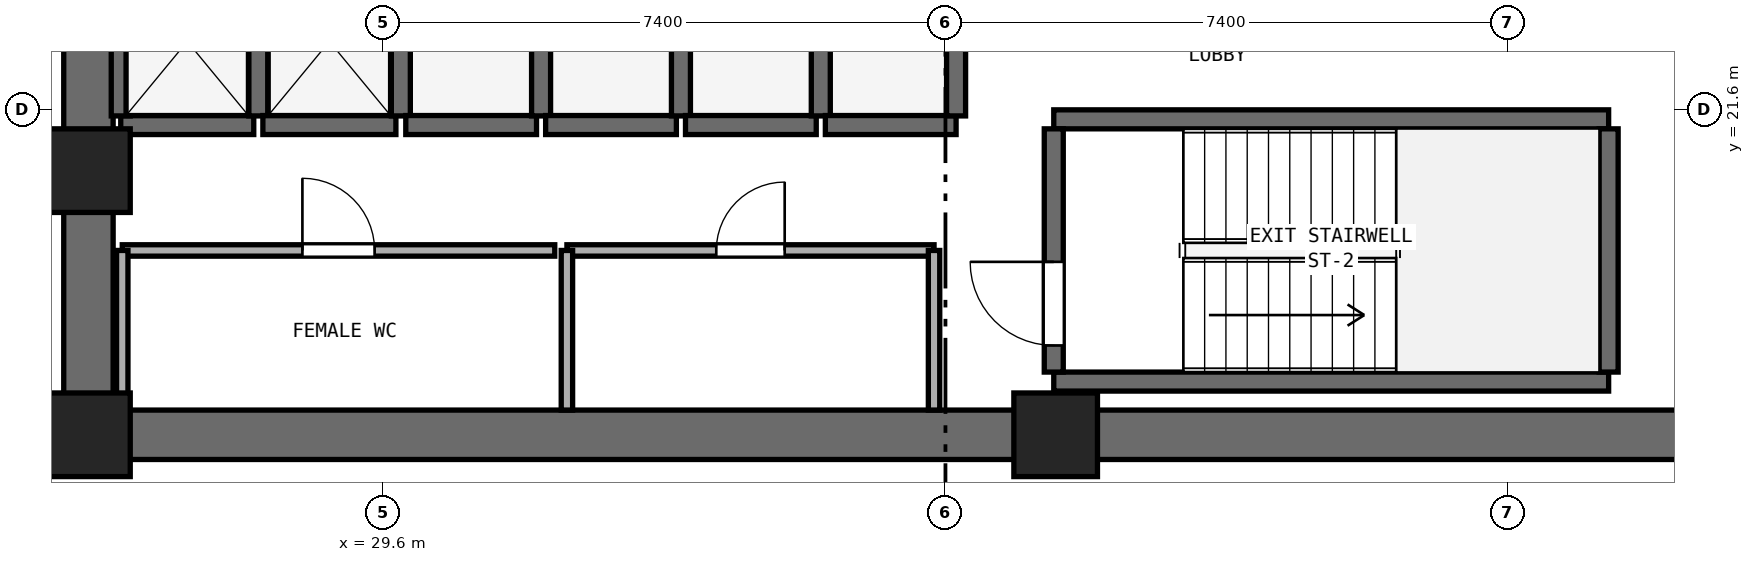
"""IFC4 building model, lengths in metres.
Left out: names, types, materials, properties, quantities, classifications, styles, units other than length and angle.
Written with IfcOpenShell. Run it as: python <this file> out.ifc"""

import sys

from ifc_helpers import new_model, si_unit, direction, frame, frame_2d, origin, origin_2d, place, context, subcontext, project, spatial, rectangle, extrude, element, fill, save


model = new_model("IFC4")
c1 = context("Model", 3, precision=1e-05, world=origin(), true_north=direction((0.0, 1.0)))
c2 = subcontext(c1, "Body", "Model", "MODEL_VIEW")
j1 = project(units=[si_unit("LENGTHUNIT", "METRE"), si_unit("PLANEANGLEUNIT", "RADIAN")], contexts=[c1])
p1 = place(None, origin())
s1 = spatial("IfcSite", under=j1, at=p1, CompositionType="ELEMENT")
p2 = place(p1, origin())
s2 = spatial("IfcBuilding", under=s1, at=p2, CompositionType="ELEMENT")
p3 = place(p2, frame((0.0, 0.0, 74.4)))
s3 = spatial("IfcBuildingStorey", under=s2, at=p3, CompositionType="ELEMENT", Elevation=74.4)
p4 = place(p3, frame((25.4, 17.325, 0.0), z_axis=(0.0, 0.0, 1.0), x_axis=(1.0, 0.0, 0.0)))
e1 = element("IfcWall", 1, at=p4, inside=s3, PredefinedType="SHEAR", context=c2, shape_type="SweptSolid", body=[
    extrude(rectangle(XDim=23.2, YDim=0.65, at=frame_2d((11.6, 0.0))), origin(), (0.0, 0.0, 1.0), 3.525),
])
p5 = place(p3, frame((25.725, 17.65, 0.0), z_axis=(0.0, 0.0, 1.0), x_axis=(0.0, 1.0, 0.0)))
e2 = element("IfcWall", 2, at=p5, inside=s3, PredefinedType="SHEAR", context=c2, shape_type="SweptSolid", body=[
    extrude(rectangle(XDim=15.1, YDim=0.65, at=frame_2d((7.55, 0.0))), origin(), (0.0, 0.0, 1.0), 3.525),
])
p6 = place(p5, frame((6.8, 0.0, 0.0)))
e3 = element("IfcOpeningElement", 3, at=p6, cuts=e2, PredefinedType="OPENING", context=c2, shape_type="SweptSolid", body=[
    extrude(rectangle(XDim=1.5, YDim=2.15, at=frame_2d((0.75, 1.075))), frame((0.0, 0.335, 0.0), z_axis=(0.0, -1.0, 0.0), x_axis=(1.0, 0.0, 0.0)), (0.0, 0.0, 1.0), 0.67),
])
for number, where, z_axis, x_axis in (
    (4, (25.725, 17.325, 0.0), (0.0, 0.0, 1.0), (1.0, 0.0, 0.0)),
    (5, (38.45, 17.325, 0.0), (0.0, 0.0, 1.0), (1.0, 0.0, 0.0)),
    (6, (25.725, 20.8, 0.0), (0.0, 0.0, 1.0), (1.0, 0.0, 0.0)),
):
    element("IfcColumn", number, at=place(p3, frame(where, z_axis=z_axis, x_axis=x_axis)), inside=s3, PredefinedType="PILASTER", context=c2, shape_type="SweptSolid", body=[
        extrude(rectangle(XDim=1.1, YDim=1.1, at=origin_2d()), origin(), (0.0, 0.0, 1.0), 3.8),
    ])
for number, where, z_axis, x_axis in (
    (7, (38.425, 18.025, 0.0), (0.0, 0.0, 1.0), (1.0, 0.0, 0.0)),
    (8, (38.425, 21.475, 0.0), (0.0, 0.0, 1.0), (1.0, 0.0, 0.0)),
):
    element("IfcWall", number, at=place(p3, frame(where, z_axis=z_axis, x_axis=x_axis)), inside=s3, PredefinedType="SHEAR", context=c2, shape_type="SweptSolid", body=[
        extrude(rectangle(XDim=7.3, YDim=0.25, at=frame_2d((3.65, 0.0))), origin(), (0.0, 0.0, 1.0), 3.525),
    ])
p7 = place(p3, frame((38.425, 18.15, 0.0), z_axis=(0.0, 0.0, 1.0), x_axis=(0.0, 1.0, 0.0)))
e9 = element("IfcWall", 9, at=p7, inside=s3, PredefinedType="SHEAR", context=c2, shape_type="SweptSolid", body=[
    extrude(rectangle(XDim=3.2, YDim=0.25, at=frame_2d((1.6, 0.0))), origin(), (0.0, 0.0, 1.0), 3.525),
])
p8 = place(p7, frame((0.35, 0.0, 0.0)))
e10 = element("IfcOpeningElement", 10, at=p8, cuts=e9, PredefinedType="OPENING", context=c2, shape_type="SweptSolid", body=[
    extrude(rectangle(XDim=1.1, YDim=2.15, at=frame_2d((0.55, 1.075))), frame((0.0, 0.135, 0.0), z_axis=(0.0, -1.0, 0.0), x_axis=(1.0, 0.0, 0.0)), (0.0, 0.0, 1.0), 0.27),
])
p9 = place(p3, frame((45.725, 18.15, 0.0), z_axis=(0.0, 0.0, 1.0), x_axis=(0.0, 1.0, 0.0)))
e11 = element("IfcWall", 11, at=p9, inside=s3, PredefinedType="SHEAR", context=c2, shape_type="SweptSolid", body=[
    extrude(rectangle(XDim=3.2, YDim=0.25, at=frame_2d((1.6, 0.0))), origin(), (0.0, 0.0, 1.0), 3.525),
])
p10 = place(p3, frame((26.15, 21.4, 0.0), z_axis=(0.0, 0.0, 1.0), x_axis=(1.0, 0.0, 0.0)))
e12 = element("IfcWall", 12, at=p10, inside=s3, PredefinedType="SHEAR", context=c2, shape_type="SweptSolid", body=[
    extrude(rectangle(XDim=1.75, YDim=0.25, at=frame_2d((0.875, 0.0))), origin(), (0.0, 0.0, 1.0), 3.525),
])
for number, where, z_axis, x_axis in (
    (13, (26.15, 21.52, 0.0), (0.0, 0.0, 1.0), (0.0, 1.0, 0.0)),
    (14, (27.96, 21.52, 0.0), (0.0, 0.0, 1.0), (0.0, 1.0, 0.0)),
):
    element("IfcWall", number, at=place(p3, frame(where, z_axis=z_axis, x_axis=x_axis)), inside=s3, PredefinedType="SHEAR", context=c2, shape_type="SweptSolid", body=[
        extrude(rectangle(XDim=1.96, YDim=0.25, at=frame_2d((0.98, 0.0))), origin(), (0.0, 0.0, 1.0), 3.525),
    ])
p11 = place(p3, frame((28.02, 21.4, 0.0), z_axis=(0.0, 0.0, 1.0), x_axis=(1.0, 0.0, 0.0)))
e15 = element("IfcWall", 15, at=p11, inside=s3, PredefinedType="SHEAR", context=c2, shape_type="SweptSolid", body=[
    extrude(rectangle(XDim=1.75, YDim=0.25, at=frame_2d((0.875, 0.0))), origin(), (0.0, 0.0, 1.0), 3.525),
])
p12 = place(p3, frame((29.835, 21.52, 0.0), z_axis=(0.0, 0.0, 1.0), x_axis=(0.0, 1.0, 0.0)))
e16 = element("IfcWall", 16, at=p12, inside=s3, PredefinedType="SHEAR", context=c2, shape_type="SweptSolid", body=[
    extrude(rectangle(XDim=1.96, YDim=0.25, at=frame_2d((0.98, 0.0))), origin(), (0.0, 0.0, 1.0), 3.525),
])
p13 = place(p3, frame((29.9, 21.4, 0.0), z_axis=(0.0, 0.0, 1.0), x_axis=(1.0, 0.0, 0.0)))
e17 = element("IfcWall", 17, at=p13, inside=s3, PredefinedType="SHEAR", context=c2, shape_type="SweptSolid", body=[
    extrude(rectangle(XDim=1.72, YDim=0.25, at=frame_2d((0.86, 0.0))), origin(), (0.0, 0.0, 1.0), 3.525),
])
p14 = place(p3, frame((31.68, 21.52, 0.0), z_axis=(0.0, 0.0, 1.0), x_axis=(0.0, 1.0, 0.0)))
e18 = element("IfcWall", 18, at=p14, inside=s3, PredefinedType="SHEAR", context=c2, shape_type="SweptSolid", body=[
    extrude(rectangle(XDim=1.96, YDim=0.25, at=frame_2d((0.98, 0.0))), origin(), (0.0, 0.0, 1.0), 3.525),
])
p15 = place(p3, frame((31.74, 21.4, 0.0), z_axis=(0.0, 0.0, 1.0), x_axis=(1.0, 0.0, 0.0)))
e19 = element("IfcWall", 19, at=p15, inside=s3, PredefinedType="SHEAR", context=c2, shape_type="SweptSolid", body=[
    extrude(rectangle(XDim=1.72, YDim=0.25, at=frame_2d((0.86, 0.0))), origin(), (0.0, 0.0, 1.0), 3.525),
])
p16 = place(p3, frame((33.52, 21.52, 0.0), z_axis=(0.0, 0.0, 1.0), x_axis=(0.0, 1.0, 0.0)))
e20 = element("IfcWall", 20, at=p16, inside=s3, PredefinedType="SHEAR", context=c2, shape_type="SweptSolid", body=[
    extrude(rectangle(XDim=1.96, YDim=0.25, at=frame_2d((0.98, 0.0))), origin(), (0.0, 0.0, 1.0), 3.525),
])
p17 = place(p3, frame((33.58, 21.4, 0.0), z_axis=(0.0, 0.0, 1.0), x_axis=(1.0, 0.0, 0.0)))
e21 = element("IfcWall", 21, at=p17, inside=s3, PredefinedType="SHEAR", context=c2, shape_type="SweptSolid", body=[
    extrude(rectangle(XDim=1.72, YDim=0.25, at=frame_2d((0.86, 0.0))), origin(), (0.0, 0.0, 1.0), 3.525),
])
p18 = place(p3, frame((35.36, 21.52, 0.0), z_axis=(0.0, 0.0, 1.0), x_axis=(0.0, 1.0, 0.0)))
e22 = element("IfcWall", 22, at=p18, inside=s3, PredefinedType="SHEAR", context=c2, shape_type="SweptSolid", body=[
    extrude(rectangle(XDim=1.96, YDim=0.25, at=frame_2d((0.98, 0.0))), origin(), (0.0, 0.0, 1.0), 3.525),
])
p19 = place(p3, frame((35.42, 21.4, 0.0), z_axis=(0.0, 0.0, 1.0), x_axis=(1.0, 0.0, 0.0)))
e23 = element("IfcWall", 23, at=p19, inside=s3, PredefinedType="SHEAR", context=c2, shape_type="SweptSolid", body=[
    extrude(rectangle(XDim=1.72, YDim=0.25, at=frame_2d((0.86, 0.0))), origin(), (0.0, 0.0, 1.0), 3.525),
])
p20 = place(p3, frame((37.14, 21.52, 0.0), z_axis=(0.0, 0.0, 1.0), x_axis=(0.0, 1.0, 0.0)))
e24 = element("IfcWall", 24, at=p20, inside=s3, PredefinedType="SHEAR", context=c2, shape_type="SweptSolid", body=[
    extrude(rectangle(XDim=1.96, YDim=0.25, at=frame_2d((0.98, 0.0))), origin(), (0.0, 0.0, 1.0), 3.525),
])
p21 = place(p3, frame((26.17, 19.75, 0.0), z_axis=(0.0, 0.0, 1.0), x_axis=(1.0, 0.0, 0.0)))
e25 = element("IfcWall", 25, at=p21, inside=s3, PredefinedType="PARTITIONING", context=c2, shape_type="SweptSolid", body=[
    extrude(rectangle(XDim=5.69, YDim=0.15, at=frame_2d((2.845, 0.0))), origin(), (0.0, 0.0, 1.0), 3.525),
])
p22 = place(p21, frame((2.37, 0.0, 0.0)))
e26 = element("IfcOpeningElement", 26, at=p22, cuts=e25, PredefinedType="OPENING", context=c2, shape_type="SweptSolid", body=[
    extrude(rectangle(XDim=0.95, YDim=2.1, at=frame_2d((0.475, 1.05))), frame((0.0, 0.085, 0.0), z_axis=(0.0, -1.0, 0.0), x_axis=(1.0, 0.0, 0.0)), (0.0, 0.0, 1.0), 0.17),
])
p23 = place(p3, frame((26.17, 17.65, 0.0), z_axis=(0.0, 0.0, 1.0), x_axis=(0.0, 1.0, 0.0)))
e27 = element("IfcWall", 27, at=p23, inside=s3, PredefinedType="PARTITIONING", context=c2, shape_type="SweptSolid", body=[
    extrude(rectangle(XDim=2.1, YDim=0.15, at=frame_2d((1.05, 0.0))), origin(), (0.0, 0.0, 1.0), 3.525),
])
p24 = place(p3, frame((32.02, 19.75, 0.0), z_axis=(0.0, 0.0, 1.0), x_axis=(1.0, 0.0, 0.0)))
e28 = element("IfcWall", 28, at=p24, inside=s3, PredefinedType="PARTITIONING", context=c2, shape_type="SweptSolid", body=[
    extrude(rectangle(XDim=4.83, YDim=0.15, at=frame_2d((2.415, 0.0))), origin(), (0.0, 0.0, 1.0), 3.525),
])
p25 = place(p24, frame((1.965, 0.0, 0.0)))
e29 = element("IfcOpeningElement", 29, at=p25, cuts=e28, PredefinedType="OPENING", context=c2, shape_type="SweptSolid", body=[
    extrude(rectangle(XDim=0.9, YDim=2.1, at=frame_2d((0.45, 1.05))), frame((0.0, 0.085, 0.0), z_axis=(0.0, -1.0, 0.0), x_axis=(1.0, 0.0, 0.0)), (0.0, 0.0, 1.0), 0.17),
])
for number, where, z_axis, x_axis in (
    (30, (32.02, 17.65, 0.0), (0.0, 0.0, 1.0), (0.0, 1.0, 0.0)),
    (31, (36.85, 17.65, 0.0), (0.0, 0.0, 1.0), (0.0, 1.0, 0.0)),
):
    element("IfcWall", number, at=place(p3, frame(where, z_axis=z_axis, x_axis=x_axis)), inside=s3, PredefinedType="PARTITIONING", context=c2, shape_type="SweptSolid", body=[
        extrude(rectangle(XDim=2.1, YDim=0.15, at=frame_2d((1.05, 0.0))), origin(), (0.0, 0.0, 1.0), 3.525),
    ])
p26 = place(p8, origin())
e32 = element("IfcDoor", 32, at=p26, inside=s3, OperationType="SINGLE_SWING_RIGHT", PredefinedType="DOOR", context=c2, shape_type="SweptSolid", body=[
    extrude(rectangle(XDim=1.1, YDim=2.15, at=frame_2d((0.55, 1.075))), frame((0.0, 0.025, 0.0), z_axis=(0.0, -1.0, 0.0), x_axis=(1.0, 0.0, 0.0)), (0.0, 0.0, 1.0), 0.05),
])
fill(e10, e32)
p27 = place(p22, origin())
e33 = element("IfcDoor", 33, at=p27, inside=s3, OperationType="SINGLE_SWING_LEFT", PredefinedType="DOOR", context=c2, shape_type="SweptSolid", body=[
    extrude(rectangle(XDim=0.95, YDim=2.1, at=frame_2d((0.475, 1.05))), frame((0.0, 0.025, 0.0), z_axis=(0.0, -1.0, 0.0), x_axis=(1.0, 0.0, 0.0)), (0.0, 0.0, 1.0), 0.05),
])
fill(e26, e33)
p28 = place(p25, origin())
e34 = element("IfcDoor", 34, at=p28, inside=s3, OperationType="SINGLE_SWING_RIGHT", PredefinedType="DOOR", context=c2, shape_type="SweptSolid", body=[
    extrude(rectangle(XDim=0.9, YDim=2.1, at=frame_2d((0.45, 1.05))), frame((0.0, 0.025, 0.0), z_axis=(0.0, -1.0, 0.0), x_axis=(1.0, 0.0, 0.0)), (0.0, 0.0, 1.0), 0.05),
])
fill(e29, e34)
save(model, sys.argv[1])
